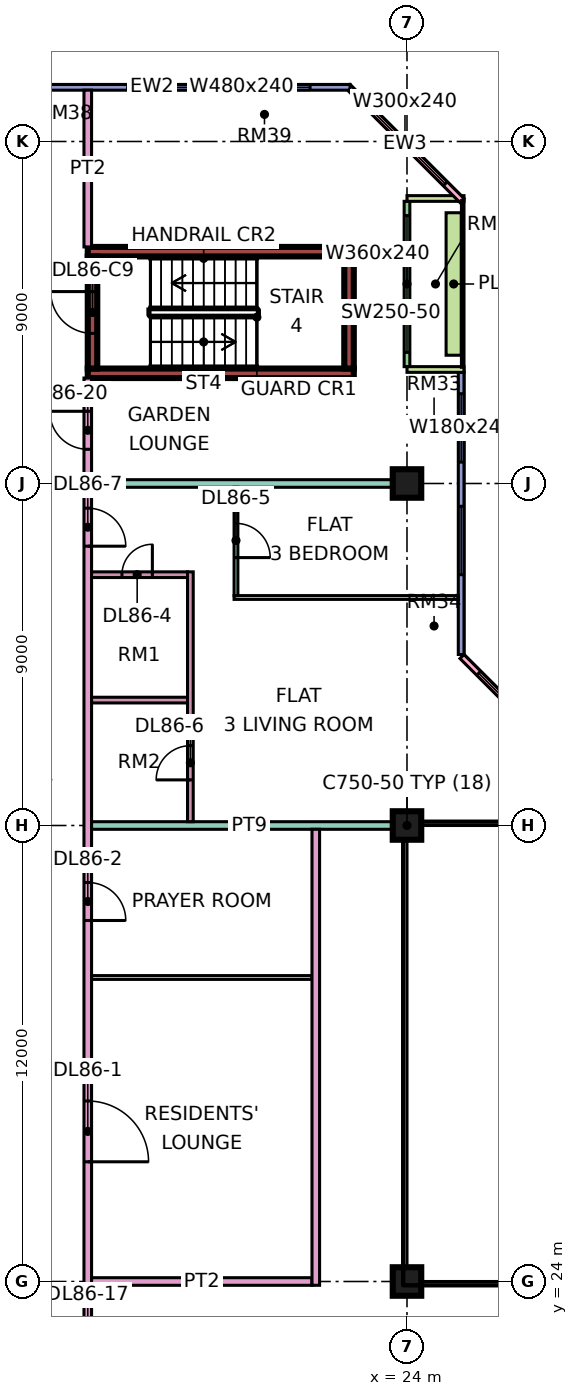
"""IFC4 building model, lengths in metres.
Left out: names, types, materials, properties, quantities, classifications, styles, units other than length and angle.
Written with IfcOpenShell. Run it as: python <this file> out.ifc"""

import sys

from ifc_helpers import new_model, si_unit, direction, frame, frame_2d, origin, origin_2d, place, context, subcontext, project, spatial, rectangle, extrude, element, fill, save


model = new_model("IFC4")
c1 = context("Model", 3, precision=1e-05, world=origin(), true_north=direction((0.0, 1.0)))
c2 = subcontext(c1, "Body", "Model", "MODEL_VIEW")
j1 = project(units=[si_unit("LENGTHUNIT", "METRE"), si_unit("PLANEANGLEUNIT", "RADIAN")], contexts=[c1])
p1 = place(None, origin())
s1 = spatial("IfcSite", under=j1, at=p1, CompositionType="ELEMENT")
p2 = place(p1, origin())
s2 = spatial("IfcBuilding", under=s1, at=p2, CompositionType="ELEMENT")
p3 = place(p2, frame((0.0, 0.0, 368.9)))
s3 = spatial("IfcBuildingStorey", under=s2, at=p3, CompositionType="ELEMENT", Elevation=368.9)
for number, where, z_axis, x_axis in (
    (1, (24.0, 24.0, 0.0), (0.0, 0.0, 1.0), (1.0, 0.0, 0.0)),
    (2, (24.0, 36.0, 0.0), (0.0, 0.0, 1.0), (1.0, 0.0, 0.0)),
    (3, (24.0, 45.0, 0.0), (0.0, 0.0, 1.0), (1.0, 0.0, 0.0)),
):
    element("IfcColumn", number, at=place(p3, frame(where, z_axis=z_axis, x_axis=x_axis)), inside=s3, PredefinedType="COLUMN", context=c2, shape_type="SweptSolid", body=[
        extrude(rectangle(XDim=0.75, YDim=0.75, at=origin_2d()), origin(), (0.0, 0.0, 1.0), 3.75),
    ])
for number, where, z_axis, x_axis in (
    (4, (15.6, 47.9, 0.0), (0.0, 0.0, 1.0), (1.0, 0.0, 0.0)),
    (5, (15.6, 51.1, 0.0), (0.0, 0.0, 1.0), (1.0, 0.0, 0.0)),
):
    element("IfcWall", number, at=place(p3, frame(where, z_axis=z_axis, x_axis=x_axis)), inside=s3, PredefinedType="SHEAR", context=c2, shape_type="SweptSolid", body=[
        extrude(rectangle(XDim=7.0, YDim=0.25, at=frame_2d((3.5, 0.0))), origin(), (0.0, 0.0, 1.0), 3.75),
    ])
p4 = place(p3, frame((15.725, 48.025, 0.0), z_axis=(0.0, 0.0, 1.0), x_axis=(0.0, 1.0, 0.0)))
e6 = element("IfcWall", 6, at=p4, inside=s3, PredefinedType="SHEAR", context=c2, shape_type="SweptSolid", body=[
    extrude(rectangle(XDim=2.95, YDim=0.25, at=frame_2d((1.475, 0.0))), origin(), (0.0, 0.0, 1.0), 3.75),
])
p5 = place(p4, frame((0.925, 0.0, 0.0)))
e7 = element("IfcOpeningElement", 7, at=p5, cuts=e6, PredefinedType="OPENING", context=c2, shape_type="SweptSolid", body=[
    extrude(rectangle(XDim=1.1, YDim=2.2, at=frame_2d((0.55, 1.1))), frame((0.0, 0.135, 0.0), z_axis=(0.0, -1.0, 0.0), x_axis=(1.0, 0.0, 0.0)), (0.0, 0.0, 1.0), 0.27),
])
p6 = place(p3, frame((22.475, 48.025, 0.0), z_axis=(0.0, 0.0, 1.0), x_axis=(0.0, 1.0, 0.0)))
e8 = element("IfcWall", 8, at=p6, inside=s3, PredefinedType="SHEAR", context=c2, shape_type="SweptSolid", body=[
    extrude(rectangle(XDim=2.95, YDim=0.25, at=frame_2d((1.475, 0.0))), origin(), (0.0, 0.0, 1.0), 3.75),
])
p7 = place(p3, frame((28.447, 37.447, 0.0), z_axis=(0.0, 0.0, 1.0), x_axis=(-0.707106781187, 0.707106781187, 0.0)))
e9 = element("IfcWall", 9, at=p7, inside=s3, PredefinedType="SOLIDWALL", context=c2, shape_type="SweptSolid", body=[
    extrude(rectangle(XDim=4.243, YDim=0.15, at=frame_2d((2.121, 0.0))), origin(), (0.0, 0.0, 1.0), 3.35),
])
p8 = place(p7, frame((0.621, 0.0, 0.45)))
e10 = element("IfcOpeningElement", 10, at=p8, cuts=e9, PredefinedType="OPENING", context=c2, shape_type="SweptSolid", body=[
    extrude(rectangle(XDim=3.0, YDim=2.4, at=frame_2d((1.5, 1.2))), frame((0.0, 0.085, 0.0), z_axis=(0.0, -1.0, 0.0), x_axis=(1.0, 0.0, 0.0)), (0.0, 0.0, 1.0), 0.17),
])
p9 = place(p3, frame((25.425, 40.5, 0.0), z_axis=(0.0, 0.0, 1.0), x_axis=(0.0, 1.0, 0.0)))
e11 = element("IfcWall", 11, at=p9, inside=s3, PredefinedType="SOLIDWALL", context=c2, shape_type="SweptSolid", body=[
    extrude(rectangle(XDim=7.425, YDim=0.15, at=frame_2d((3.712, 0.0))), origin(), (0.0, 0.0, 1.0), 3.35),
])
p10 = place(p9, frame((2.1, 0.0, 0.45)))
e12 = element("IfcOpeningElement", 12, at=p10, cuts=e11, PredefinedType="OPENING", context=c2, shape_type="SweptSolid", body=[
    extrude(rectangle(XDim=1.8, YDim=2.4, at=frame_2d((0.9, 1.2))), frame((0.0, 0.085, 0.0), z_axis=(0.0, -1.0, 0.0), x_axis=(1.0, 0.0, 0.0)), (0.0, 0.0, 1.0), 0.17),
])
p11 = place(p9, frame((5.062, 0.0, 0.45)))
e13 = element("IfcOpeningElement", 13, at=p11, cuts=e11, PredefinedType="OPENING", context=c2, shape_type="SweptSolid", body=[
    extrude(rectangle(XDim=1.8, YDim=2.4, at=frame_2d((0.9, 1.2))), frame((0.0, 0.085, 0.0), z_axis=(0.0, -1.0, 0.0), x_axis=(1.0, 0.0, 0.0)), (0.0, 0.0, 1.0), 0.17),
])
p12 = place(p3, frame((24.0, 48.075, 0.0), z_axis=(0.0, 0.0, 1.0), x_axis=(0.0, 1.0, 0.0)))
e14 = element("IfcWall", 14, at=p12, inside=s3, PredefinedType="SOLIDWALL", context=c2, shape_type="SweptSolid", body=[
    extrude(rectangle(XDim=4.35, YDim=0.15, at=frame_2d((2.175, 0.0))), origin(), (0.0, 0.0, 1.0), 3.35),
])
p13 = place(p12, frame((0.375, 0.0, 0.45)))
e15 = element("IfcOpeningElement", 15, at=p13, cuts=e14, PredefinedType="OPENING", context=c2, shape_type="SweptSolid", body=[
    extrude(rectangle(XDim=3.6, YDim=2.4, at=frame_2d((1.8, 1.2))), frame((0.0, 0.085, 0.0), z_axis=(0.0, -1.0, 0.0), x_axis=(1.0, 0.0, 0.0)), (0.0, 0.0, 1.0), 0.17),
])
for number, where, z_axis, x_axis in (
    (16, (25.5, 48.0, 0.0), (0.0, 0.0, 1.0), (-1.0, 0.0, 0.0)),
    (17, (25.5, 52.5, 0.0), (0.0, 0.0, 1.0), (-1.0, 0.0, 0.0)),
):
    element("IfcWall", number, at=place(p3, frame(where, z_axis=z_axis, x_axis=x_axis)), inside=s3, PredefinedType="SOLIDWALL", context=c2, shape_type="SweptSolid", body=[
        extrude(rectangle(XDim=1.5, YDim=0.15, at=frame_2d((0.75, 0.0))), origin(), (0.0, 0.0, 1.0), 3.35),
    ])
p14 = place(p3, frame((25.447, 52.447, 0.0), z_axis=(0.0, 0.0, 1.0), x_axis=(-0.707106781187, 0.707106781187, 0.0)))
e18 = element("IfcWall", 18, at=p14, inside=s3, PredefinedType="SOLIDWALL", context=c2, shape_type="SweptSolid", body=[
    extrude(rectangle(XDim=4.243, YDim=0.15, at=frame_2d((2.121, 0.0))), origin(), (0.0, 0.0, 1.0), 3.35),
])
p15 = place(p14, frame((0.621, 0.0, 0.45)))
e19 = element("IfcOpeningElement", 19, at=p15, cuts=e18, PredefinedType="OPENING", context=c2, shape_type="SweptSolid", body=[
    extrude(rectangle(XDim=3.0, YDim=2.4, at=frame_2d((1.5, 1.2))), frame((0.0, 0.085, 0.0), z_axis=(0.0, -1.0, 0.0), x_axis=(1.0, 0.0, 0.0)), (0.0, 0.0, 1.0), 0.17),
])
p16 = place(p3, frame((22.5, 55.425, 0.0), z_axis=(0.0, 0.0, 1.0), x_axis=(-1.0, 0.0, 0.0)))
e20 = element("IfcWall", 20, at=p16, inside=s3, PredefinedType="SOLIDWALL", context=c2, shape_type="SweptSolid", body=[
    extrude(rectangle(XDim=10.425, YDim=0.15, at=frame_2d((5.212, 0.0))), origin(), (0.0, 0.0, 1.0), 3.35),
])
p17 = place(p16, frame((1.05, 0.0, 0.45)))
e21 = element("IfcOpeningElement", 21, at=p17, cuts=e20, PredefinedType="OPENING", context=c2, shape_type="SweptSolid", body=[
    extrude(rectangle(XDim=4.8, YDim=2.4, at=frame_2d((2.4, 1.2))), frame((0.0, 0.085, 0.0), z_axis=(0.0, -1.0, 0.0), x_axis=(1.0, 0.0, 0.0)), (0.0, 0.0, 1.0), 0.17),
])
p18 = place(p3, frame((25.229, 48.375, 0.0), z_axis=(0.0, 0.0, 1.0), x_axis=(0.0, 1.0, 0.0)))
e22 = element("IfcWall", 22, at=p18, inside=s3, PredefinedType="SOLIDWALL", context=c2, shape_type="SweptSolid", body=[
    extrude(rectangle(XDim=3.75, YDim=0.4, at=frame_2d((1.875, 0.0))), origin(), (0.0, 0.0, 1.0), 0.7),
])
p19 = place(p3, frame((15.6, 20.0, 0.0), z_axis=(0.0, 0.0, 1.0), x_axis=(0.0, 1.0, 0.0)))
e23 = element("IfcWall", 23, at=p19, inside=s3, PredefinedType="PARTITIONING", context=c2, shape_type="SweptSolid", body=[
    extrude(rectangle(XDim=27.775, YDim=0.2, at=frame_2d((13.887, 0.0))), origin(), (0.0, 0.0, 1.0), 3.35),
])
p20 = place(p19, frame((7.15, 0.0, 0.0)))
e24 = element("IfcOpeningElement", 24, at=p20, cuts=e23, PredefinedType="OPENING", context=c2, shape_type="SweptSolid", body=[
    extrude(rectangle(XDim=1.6, YDim=2.1, at=frame_2d((0.8, 1.05))), frame((0.0, 0.11, 0.0), z_axis=(0.0, -1.0, 0.0), x_axis=(1.0, 0.0, 0.0)), (0.0, 0.0, 1.0), 0.22),
])
p21 = place(p19, frame((13.5, 0.0, 0.0)))
e25 = element("IfcOpeningElement", 25, at=p21, cuts=e23, PredefinedType="OPENING", context=c2, shape_type="SweptSolid", body=[
    extrude(rectangle(XDim=1.0, YDim=2.1, at=frame_2d((0.5, 1.05))), frame((0.0, 0.11, 0.0), z_axis=(0.0, -1.0, 0.0), x_axis=(1.0, 0.0, 0.0)), (0.0, 0.0, 1.0), 0.22),
])
p22 = place(p19, frame((23.35, 0.0, 0.0)))
e26 = element("IfcOpeningElement", 26, at=p22, cuts=e23, PredefinedType="OPENING", context=c2, shape_type="SweptSolid", body=[
    extrude(rectangle(XDim=1.0, YDim=2.1, at=frame_2d((0.5, 1.05))), frame((0.0, 0.11, 0.0), z_axis=(0.0, -1.0, 0.0), x_axis=(1.0, 0.0, 0.0)), (0.0, 0.0, 1.0), 0.22),
])
p23 = place(p19, frame((1.15, 0.0, 0.0)))
e27 = element("IfcOpeningElement", 27, at=p23, cuts=e23, PredefinedType="OPENING", context=c2, shape_type="SweptSolid", body=[
    extrude(rectangle(XDim=1.8, YDim=2.1, at=frame_2d((0.9, 1.05))), frame((0.0, 0.11, 0.0), z_axis=(0.0, -1.0, 0.0), x_axis=(1.0, 0.0, 0.0)), (0.0, 0.0, 1.0), 0.22),
])
p24 = place(p19, frame((25.9, 0.0, 0.0)))
e28 = element("IfcOpeningElement", 28, at=p24, cuts=e23, PredefinedType="OPENING", context=c2, shape_type="SweptSolid", body=[
    extrude(rectangle(XDim=1.0, YDim=2.1, at=frame_2d((0.5, 1.05))), frame((0.0, 0.11, 0.0), z_axis=(0.0, -1.0, 0.0), x_axis=(1.0, 0.0, 0.0)), (0.0, 0.0, 1.0), 0.22),
])
p25 = place(p3, frame((15.6, 51.225, 0.0), z_axis=(0.0, 0.0, 1.0), x_axis=(0.0, 1.0, 0.0)))
e29 = element("IfcWall", 29, at=p25, inside=s3, PredefinedType="PARTITIONING", context=c2, shape_type="SweptSolid", body=[
    extrude(rectangle(XDim=4.125, YDim=0.2, at=frame_2d((2.062, 0.0))), origin(), (0.0, 0.0, 1.0), 3.35),
])
p26 = place(p3, frame((15.7, 24.0, 0.0), z_axis=(0.0, 0.0, 1.0), x_axis=(1.0, 0.0, 0.0)))
e30 = element("IfcWall", 30, at=p26, inside=s3, PredefinedType="PARTITIONING", context=c2, shape_type="SweptSolid", body=[
    extrude(rectangle(XDim=5.8, YDim=0.2, at=frame_2d((2.9, 0.0))), origin(), (0.0, 0.0, 1.0), 3.35),
])
p27 = place(p3, frame((15.7, 32.0, 0.0), z_axis=(0.0, 0.0, 1.0), x_axis=(1.0, 0.0, 0.0)))
e31 = element("IfcWall", 31, at=p27, inside=s3, PredefinedType="PARTITIONING", context=c2, shape_type="SweptSolid", body=[
    extrude(rectangle(XDim=5.8, YDim=0.1, at=frame_2d((2.9, 0.0))), origin(), (0.0, 0.0, 1.0), 3.35),
])
p28 = place(p3, frame((15.7, 36.0, 0.0), z_axis=(0.0, 0.0, 1.0), x_axis=(1.0, 0.0, 0.0)))
e32 = element("IfcWall", 32, at=p28, inside=s3, PredefinedType="PARTITIONING", context=c2, shape_type="SweptSolid", body=[
    extrude(rectangle(XDim=8.3, YDim=0.2, at=frame_2d((4.15, 0.0))), origin(), (0.0, 0.0, 1.0), 3.35),
])
p29 = place(p3, frame((15.7, 39.3, 0.0), z_axis=(0.0, 0.0, 1.0), x_axis=(1.0, 0.0, 0.0)))
e33 = element("IfcWall", 33, at=p29, inside=s3, PredefinedType="PARTITIONING", context=c2, shape_type="SweptSolid", body=[
    extrude(rectangle(XDim=2.525, YDim=0.15, at=frame_2d((1.263, 0.0))), origin(), (0.0, 0.0, 1.0), 3.35),
])
p30 = place(p3, frame((15.7, 42.6, 0.0), z_axis=(0.0, 0.0, 1.0), x_axis=(1.0, 0.0, 0.0)))
e34 = element("IfcWall", 34, at=p30, inside=s3, PredefinedType="PARTITIONING", context=c2, shape_type="SweptSolid", body=[
    extrude(rectangle(XDim=2.525, YDim=0.15, at=frame_2d((1.263, 0.0))), origin(), (0.0, 0.0, 1.0), 3.35),
])
p31 = place(p30, frame((0.8, 0.0, 0.0)))
e35 = element("IfcOpeningElement", 35, at=p31, cuts=e34, PredefinedType="OPENING", context=c2, shape_type="SweptSolid", body=[
    extrude(rectangle(XDim=0.8, YDim=2.1, at=frame_2d((0.4, 1.05))), frame((0.0, 0.085, 0.0), z_axis=(0.0, -1.0, 0.0), x_axis=(1.0, 0.0, 0.0)), (0.0, 0.0, 1.0), 0.17),
])
p32 = place(p3, frame((15.7, 45.0, 0.0), z_axis=(0.0, 0.0, 1.0), x_axis=(1.0, 0.0, 0.0)))
e36 = element("IfcWall", 36, at=p32, inside=s3, PredefinedType="PARTITIONING", context=c2, shape_type="SweptSolid", body=[
    extrude(rectangle(XDim=8.3, YDim=0.2, at=frame_2d((4.15, 0.0))), origin(), (0.0, 0.0, 1.0), 3.35),
])
p33 = place(p3, frame((18.3, 36.1, 0.0), z_axis=(0.0, 0.0, 1.0), x_axis=(0.0, 1.0, 0.0)))
e37 = element("IfcWall", 37, at=p33, inside=s3, PredefinedType="PARTITIONING", context=c2, shape_type="SweptSolid", body=[
    extrude(rectangle(XDim=6.575, YDim=0.15, at=frame_2d((3.288, 0.0))), origin(), (0.0, 0.0, 1.0), 3.35),
])
p34 = place(p33, frame((1.1, 0.0, 0.0)))
e38 = element("IfcOpeningElement", 38, at=p34, cuts=e37, PredefinedType="OPENING", context=c2, shape_type="SweptSolid", body=[
    extrude(rectangle(XDim=0.9, YDim=2.1, at=frame_2d((0.45, 1.05))), frame((0.0, 0.085, 0.0), z_axis=(0.0, -1.0, 0.0), x_axis=(1.0, 0.0, 0.0)), (0.0, 0.0, 1.0), 0.17),
])
p35 = place(p3, frame((19.45, 42.0, 0.0), z_axis=(0.0, 0.0, 1.0), x_axis=(1.0, 0.0, 0.0)))
e39 = element("IfcWall", 39, at=p35, inside=s3, PredefinedType="PARTITIONING", context=c2, shape_type="SweptSolid", body=[
    extrude(rectangle(XDim=5.9, YDim=0.1, at=frame_2d((2.95, 0.0))), origin(), (0.0, 0.0, 1.0), 3.35),
])
p36 = place(p3, frame((19.5, 42.05, 0.0), z_axis=(0.0, 0.0, 1.0), x_axis=(0.0, 1.0, 0.0)))
e40 = element("IfcWall", 40, at=p36, inside=s3, PredefinedType="PARTITIONING", context=c2, shape_type="SweptSolid", body=[
    extrude(rectangle(XDim=2.85, YDim=0.1, at=frame_2d((1.425, 0.0))), origin(), (0.0, 0.0, 1.0), 3.35),
])
p37 = place(p36, frame((1.0, 0.0, 0.0)))
e41 = element("IfcOpeningElement", 41, at=p37, cuts=e40, PredefinedType="OPENING", context=c2, shape_type="SweptSolid", body=[
    extrude(rectangle(XDim=0.9, YDim=2.1, at=frame_2d((0.45, 1.05))), frame((0.0, 0.06, 0.0), z_axis=(0.0, -1.0, 0.0), x_axis=(1.0, 0.0, 0.0)), (0.0, 0.0, 1.0), 0.12),
])
p38 = place(p3, frame((21.6, 23.9, 0.0), z_axis=(0.0, 0.0, 1.0), x_axis=(0.0, 1.0, 0.0)))
e42 = element("IfcWall", 42, at=p38, inside=s3, PredefinedType="PARTITIONING", context=c2, shape_type="SweptSolid", body=[
    extrude(rectangle(XDim=12.0, YDim=0.2, at=frame_2d((6.0, 0.0))), origin(), (0.0, 0.0, 1.0), 3.35),
])
p39 = place(p8, origin())
e43 = element("IfcWindow", 43, at=p39, inside=s3, PartitioningType="SINGLE_PANEL", PredefinedType="WINDOW", context=c2, shape_type="SweptSolid", body=[
    extrude(rectangle(XDim=3.0, YDim=2.4, at=frame_2d((1.5, 1.2))), frame((0.0, 0.03, 0.0), z_axis=(0.0, -1.0, 0.0), x_axis=(1.0, 0.0, 0.0)), (0.0, 0.0, 1.0), 0.06),
])
fill(e10, e43)
p40 = place(p10, origin())
e44 = element("IfcWindow", 44, at=p40, inside=s3, PartitioningType="SINGLE_PANEL", PredefinedType="WINDOW", context=c2, shape_type="SweptSolid", body=[
    extrude(rectangle(XDim=1.8, YDim=2.4, at=frame_2d((0.9, 1.2))), frame((0.0, 0.03, 0.0), z_axis=(0.0, -1.0, 0.0), x_axis=(1.0, 0.0, 0.0)), (0.0, 0.0, 1.0), 0.06),
])
fill(e12, e44)
p41 = place(p11, origin())
e45 = element("IfcWindow", 45, at=p41, inside=s3, PartitioningType="SINGLE_PANEL", PredefinedType="WINDOW", context=c2, shape_type="SweptSolid", body=[
    extrude(rectangle(XDim=1.8, YDim=2.4, at=frame_2d((0.9, 1.2))), frame((0.0, 0.03, 0.0), z_axis=(0.0, -1.0, 0.0), x_axis=(1.0, 0.0, 0.0)), (0.0, 0.0, 1.0), 0.06),
])
fill(e13, e45)
p42 = place(p13, origin())
e46 = element("IfcWindow", 46, at=p42, inside=s3, PartitioningType="SINGLE_PANEL", PredefinedType="WINDOW", context=c2, shape_type="SweptSolid", body=[
    extrude(rectangle(XDim=3.6, YDim=2.4, at=frame_2d((1.8, 1.2))), frame((0.0, 0.03, 0.0), z_axis=(0.0, -1.0, 0.0), x_axis=(1.0, 0.0, 0.0)), (0.0, 0.0, 1.0), 0.06),
])
fill(e15, e46)
p43 = place(p15, origin())
e47 = element("IfcWindow", 47, at=p43, inside=s3, PartitioningType="SINGLE_PANEL", PredefinedType="WINDOW", context=c2, shape_type="SweptSolid", body=[
    extrude(rectangle(XDim=3.0, YDim=2.4, at=frame_2d((1.5, 1.2))), frame((0.0, 0.03, 0.0), z_axis=(0.0, -1.0, 0.0), x_axis=(1.0, 0.0, 0.0)), (0.0, 0.0, 1.0), 0.06),
])
fill(e19, e47)
p44 = place(p17, origin())
e48 = element("IfcWindow", 48, at=p44, inside=s3, PartitioningType="SINGLE_PANEL", PredefinedType="WINDOW", context=c2, shape_type="SweptSolid", body=[
    extrude(rectangle(XDim=4.8, YDim=2.4, at=frame_2d((2.4, 1.2))), frame((0.0, 0.03, 0.0), z_axis=(0.0, -1.0, 0.0), x_axis=(1.0, 0.0, 0.0)), (0.0, 0.0, 1.0), 0.06),
])
fill(e21, e48)
p45 = place(p5, frame((1.1, 0.0, 0.0), z_axis=(0.0, 0.0, 1.0), x_axis=(-1.0, 0.0, 0.0)))
e49 = element("IfcDoor", 49, at=p45, inside=s3, OperationType="SINGLE_SWING_RIGHT", PredefinedType="DOOR", context=c2, shape_type="SweptSolid", body=[
    extrude(rectangle(XDim=1.1, YDim=2.2, at=frame_2d((0.55, 1.1))), frame((0.0, 0.025, 0.0), z_axis=(0.0, -1.0, 0.0), x_axis=(1.0, 0.0, 0.0)), (0.0, 0.0, 1.0), 0.05),
])
fill(e7, e49)
p46 = place(p20, frame((1.6, 0.0, 0.0), z_axis=(0.0, 0.0, 1.0), x_axis=(-1.0, 0.0, 0.0)))
e50 = element("IfcDoor", 50, at=p46, inside=s3, OperationType="DOUBLE_DOOR_SINGLE_SWING", PredefinedType="DOOR", context=c2, shape_type="SweptSolid", body=[
    extrude(rectangle(XDim=1.6, YDim=2.1, at=frame_2d((0.8, 1.05))), frame((0.0, 0.025, 0.0), z_axis=(0.0, -1.0, 0.0), x_axis=(1.0, 0.0, 0.0)), (0.0, 0.0, 1.0), 0.05),
])
fill(e24, e50)
p47 = place(p21, frame((1.0, 0.0, 0.0), z_axis=(0.0, 0.0, 1.0), x_axis=(-1.0, 0.0, 0.0)))
e51 = element("IfcDoor", 51, at=p47, inside=s3, OperationType="SINGLE_SWING_LEFT", PredefinedType="DOOR", context=c2, shape_type="SweptSolid", body=[
    extrude(rectangle(XDim=1.0, YDim=2.1, at=frame_2d((0.5, 1.05))), frame((0.0, 0.025, 0.0), z_axis=(0.0, -1.0, 0.0), x_axis=(1.0, 0.0, 0.0)), (0.0, 0.0, 1.0), 0.05),
])
fill(e25, e51)
p48 = place(p31, frame((0.8, 0.0, 0.0), z_axis=(0.0, 0.0, 1.0), x_axis=(-1.0, 0.0, 0.0)))
e52 = element("IfcDoor", 52, at=p48, inside=s3, OperationType="SINGLE_SWING_RIGHT", PredefinedType="DOOR", context=c2, shape_type="SweptSolid", body=[
    extrude(rectangle(XDim=0.8, YDim=2.1, at=frame_2d((0.4, 1.05))), frame((0.0, 0.025, 0.0), z_axis=(0.0, -1.0, 0.0), x_axis=(1.0, 0.0, 0.0)), (0.0, 0.0, 1.0), 0.05),
])
fill(e35, e52)
p49 = place(p37, frame((0.9, 0.0, 0.0), z_axis=(0.0, 0.0, 1.0), x_axis=(-1.0, 0.0, 0.0)))
e53 = element("IfcDoor", 53, at=p49, inside=s3, OperationType="SINGLE_SWING_LEFT", PredefinedType="DOOR", context=c2, shape_type="SweptSolid", body=[
    extrude(rectangle(XDim=0.9, YDim=2.1, at=frame_2d((0.45, 1.05))), frame((0.0, 0.025, 0.0), z_axis=(0.0, -1.0, 0.0), x_axis=(1.0, 0.0, 0.0)), (0.0, 0.0, 1.0), 0.05),
])
fill(e41, e53)
p50 = place(p34, origin())
e54 = element("IfcDoor", 54, at=p50, inside=s3, OperationType="SINGLE_SWING_LEFT", PredefinedType="DOOR", context=c2, shape_type="SweptSolid", body=[
    extrude(rectangle(XDim=0.9, YDim=2.1, at=frame_2d((0.45, 1.05))), frame((0.0, 0.025, 0.0), z_axis=(0.0, -1.0, 0.0), x_axis=(1.0, 0.0, 0.0)), (0.0, 0.0, 1.0), 0.05),
])
fill(e38, e54)
p51 = place(p22, frame((1.0, 0.0, 0.0), z_axis=(0.0, 0.0, 1.0), x_axis=(-1.0, 0.0, 0.0)))
e55 = element("IfcDoor", 55, at=p51, inside=s3, OperationType="SINGLE_SWING_LEFT", PredefinedType="DOOR", context=c2, shape_type="SweptSolid", body=[
    extrude(rectangle(XDim=1.0, YDim=2.1, at=frame_2d((0.5, 1.05))), frame((0.0, 0.025, 0.0), z_axis=(0.0, -1.0, 0.0), x_axis=(1.0, 0.0, 0.0)), (0.0, 0.0, 1.0), 0.05),
])
fill(e26, e55)
p52 = place(p24, frame((1.0, 0.0, 0.0), z_axis=(0.0, 0.0, 1.0), x_axis=(-1.0, 0.0, 0.0)))
e56 = element("IfcDoor", 56, at=p52, inside=s3, OperationType="SINGLE_SWING_RIGHT", PredefinedType="DOOR", context=c2, shape_type="SweptSolid", body=[
    extrude(rectangle(XDim=1.0, YDim=2.1, at=frame_2d((0.5, 1.05))), frame((0.0, 0.025, 0.0), z_axis=(0.0, -1.0, 0.0), x_axis=(1.0, 0.0, 0.0)), (0.0, 0.0, 1.0), 0.05),
])
fill(e28, e56)
save(model, sys.argv[1])
